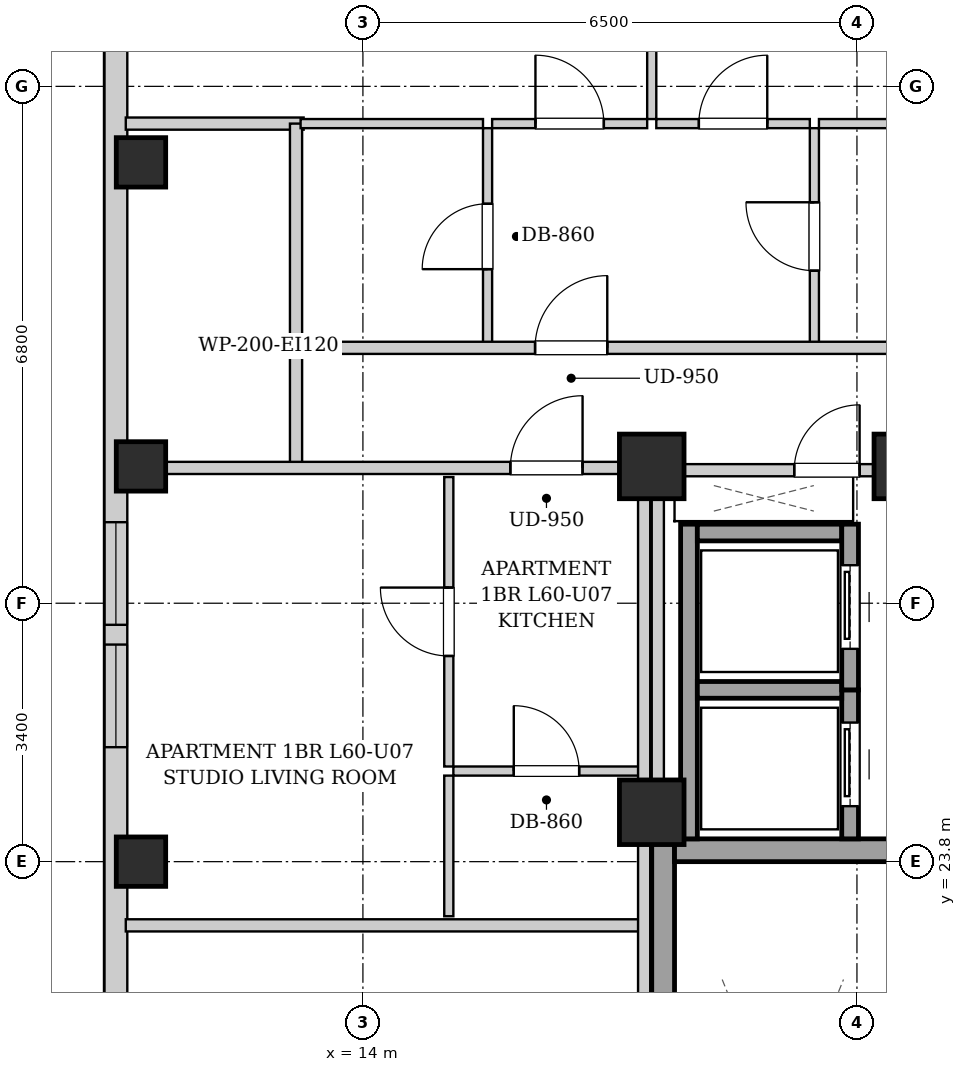
"""IFC4 building model, lengths in metres.
Left out: names, types, materials, properties, quantities, classifications, styles, units other than length and angle.
Written with IfcOpenShell. Run it as: python <this file> out.ifc"""

import sys

from ifc_helpers import new_model, si_unit, direction, frame, frame_2d, origin, origin_2d, place, context, subcontext, project, spatial, rectangle, extrude, element, fill, save


model = new_model("IFC4")
c1 = context("Model", 3, precision=1e-05, world=origin(), true_north=direction((0.0, 1.0)))
c2 = subcontext(c1, "Body", "Model", "MODEL_VIEW")
j1 = project(units=[si_unit("LENGTHUNIT", "METRE"), si_unit("PLANEANGLEUNIT", "RADIAN")], contexts=[c1])
p1 = place(None, origin())
s1 = spatial("IfcSite", under=j1, at=p1, CompositionType="ELEMENT")
p2 = place(p1, origin())
s2 = spatial("IfcBuilding", under=s1, at=p2, CompositionType="ELEMENT")
p3 = place(p2, frame((0.0, 0.0, 207.4)))
s3 = spatial("IfcBuildingStorey", under=s2, at=p3, CompositionType="ELEMENT", Elevation=207.4)
for number, where, z_axis, x_axis in (
    (1, (11.08, 23.8, 0.0), (0.0, 0.0, 1.0), (1.0, 0.0, 0.0)),
    (2, (11.08, 29.0, 0.0), (0.0, 0.0, 1.0), (1.0, 0.0, 0.0)),
    (3, (11.08, 33.0, 0.0), (0.0, 0.0, 1.0), (1.0, 0.0, 0.0)),
):
    element("IfcColumn", number, at=place(p3, frame(where, z_axis=z_axis, x_axis=x_axis)), inside=s3, PredefinedType="COLUMN", context=c2, shape_type="SweptSolid", body=[
        extrude(rectangle(XDim=0.65, YDim=0.65, at=origin_2d()), origin(), (0.0, 0.0, 1.0), 3.3),
    ])
for number, where, z_axis, x_axis in (
    (4, (17.8, 29.0, 0.0), (0.0, 0.0, 1.0), (1.0, 0.0, 0.0)),
    (5, (21.15, 29.0, 0.0), (0.0, 0.0, 1.0), (1.0, 0.0, 0.0)),
    (6, (17.8, 24.45, 0.0), (0.0, 0.0, 1.0), (1.0, 0.0, 0.0)),
):
    element("IfcColumn", number, at=place(p3, frame(where, z_axis=z_axis, x_axis=x_axis)), inside=s3, PredefinedType="COLUMN", context=c2, shape_type="SweptSolid", body=[
        extrude(rectangle(XDim=0.85, YDim=0.85, at=origin_2d()), origin(), (0.0, 0.0, 1.0), 3.3),
    ])
p4 = place(p3, frame((10.75, 6.3, 0.0), z_axis=(0.0, 0.0, 1.0), x_axis=(0.0, 1.0, 0.0)))
e7 = element("IfcWall", 7, at=p4, inside=s3, PredefinedType="SOLIDWALL", context=c2, shape_type="SweptSolid", body=[
    extrude(rectangle(XDim=31.4, YDim=0.3, at=frame_2d((15.7, 0.0))), origin(), (0.0, 0.0, 1.0), 3.04),
])
p5 = place(p4, frame((1.504, 0.0, 0.55)))
e8 = element("IfcOpeningElement", 8, at=p5, cuts=e7, PredefinedType="OPENING", context=c2, shape_type="SweptSolid", body=[
    extrude(rectangle(XDim=1.35, YDim=1.2, at=frame_2d((0.675, 0.6))), frame((0.0, 0.16, 0.0), z_axis=(0.0, -1.0, 0.0), x_axis=(1.0, 0.0, 0.0)), (0.0, 0.0, 1.0), 0.32),
])
p6 = place(p4, frame((28.546, 0.0, 0.55)))
e9 = element("IfcOpeningElement", 9, at=p6, cuts=e7, PredefinedType="OPENING", context=c2, shape_type="SweptSolid", body=[
    extrude(rectangle(XDim=1.35, YDim=1.2, at=frame_2d((0.675, 0.6))), frame((0.0, 0.16, 0.0), z_axis=(0.0, -1.0, 0.0), x_axis=(1.0, 0.0, 0.0)), (0.0, 0.0, 1.0), 0.32),
])
p7 = place(p4, frame((11.85, 0.0, 0.55)))
e10 = element("IfcOpeningElement", 10, at=p7, cuts=e7, PredefinedType="OPENING", context=c2, shape_type="SweptSolid", body=[
    extrude(rectangle(XDim=1.35, YDim=1.2, at=frame_2d((0.675, 0.6))), frame((0.0, 0.16, 0.0), z_axis=(0.0, -1.0, 0.0), x_axis=(1.0, 0.0, 0.0)), (0.0, 0.0, 1.0), 0.32),
])
p8 = place(p4, frame((9.185, 0.0, 0.55)))
e11 = element("IfcOpeningElement", 11, at=p8, cuts=e7, PredefinedType="OPENING", context=c2, shape_type="SweptSolid", body=[
    extrude(rectangle(XDim=1.35, YDim=1.2, at=frame_2d((0.675, 0.6))), frame((0.0, 0.16, 0.0), z_axis=(0.0, -1.0, 0.0), x_axis=(1.0, 0.0, 0.0)), (0.0, 0.0, 1.0), 0.32),
])
p9 = place(p4, frame((19.006, 0.0, 0.55)))
e12 = element("IfcOpeningElement", 12, at=p9, cuts=e7, PredefinedType="OPENING", context=c2, shape_type="SweptSolid", body=[
    extrude(rectangle(XDim=1.35, YDim=1.2, at=frame_2d((0.675, 0.6))), frame((0.0, 0.16, 0.0), z_axis=(0.0, -1.0, 0.0), x_axis=(1.0, 0.0, 0.0)), (0.0, 0.0, 1.0), 0.32),
])
p10 = place(p4, frame((20.616, 0.0, 0.55)))
e13 = element("IfcOpeningElement", 13, at=p10, cuts=e7, PredefinedType="OPENING", context=c2, shape_type="SweptSolid", body=[
    extrude(rectangle(XDim=1.35, YDim=1.2, at=frame_2d((0.675, 0.6))), frame((0.0, 0.16, 0.0), z_axis=(0.0, -1.0, 0.0), x_axis=(1.0, 0.0, 0.0)), (0.0, 0.0, 1.0), 0.32),
])
p11 = place(p3, frame((17.95, 15.1, 0.0), z_axis=(0.0, 0.0, 1.0), x_axis=(0.0, 1.0, 0.0)))
e14 = element("IfcWall", 14, at=p11, inside=s3, PredefinedType="SHEAR", context=c2, shape_type="SweptSolid", body=[
    extrude(rectangle(XDim=9.0, YDim=0.3, at=frame_2d((4.5, 0.0))), origin(), (0.0, 0.0, 1.0), 3.04),
])
p12 = place(p3, frame((18.1, 23.95, 0.0), z_axis=(0.0, 0.0, 1.0), x_axis=(1.0, 0.0, 0.0)))
e15 = element("IfcWall", 15, at=p12, inside=s3, PredefinedType="SHEAR", context=c2, shape_type="SweptSolid", body=[
    extrude(rectangle(XDim=2.85, YDim=0.3, at=frame_2d((1.425, 0.0))), origin(), (0.0, 0.0, 1.0), 3.04),
])
p13 = place(p3, frame((18.29, 24.1, 0.0), z_axis=(0.0, 0.0, 1.0), x_axis=(0.0, 1.0, 0.0)))
e16 = element("IfcWall", 16, at=p13, inside=s3, PredefinedType="SHEAR", context=c2, shape_type="SweptSolid", body=[
    extrude(rectangle(XDim=4.14, YDim=0.22, at=frame_2d((2.07, 0.0))), origin(), (0.0, 0.0, 1.0), 3.04),
])
p14 = place(p3, frame((20.41, 24.1, 0.0), z_axis=(0.0, 0.0, 1.0), x_axis=(0.0, 1.0, 0.0)))
e17 = element("IfcWall", 17, at=p14, inside=s3, PredefinedType="SHEAR", context=c2, shape_type="SweptSolid", body=[
    extrude(rectangle(XDim=1.96, YDim=0.22, at=frame_2d((0.98, 0.0))), origin(), (0.0, 0.0, 1.0), 3.04),
])
p15 = place(p14, frame((0.43, 0.0, 0.0)))
e18 = element("IfcOpeningElement", 18, at=p15, cuts=e17, PredefinedType="OPENING", context=c2, shape_type="SweptSolid", body=[
    extrude(rectangle(XDim=1.1, YDim=2.15, at=frame_2d((0.55, 1.075))), frame((0.0, 0.12, 0.0), z_axis=(0.0, -1.0, 0.0), x_axis=(1.0, 0.0, 0.0)), (0.0, 0.0, 1.0), 0.24),
])
for number, where, z_axis, x_axis in (
    (19, (18.4, 26.06, 0.0), (0.0, 0.0, 1.0), (1.0, 0.0, 0.0)),
    (20, (18.4, 28.13, 0.0), (0.0, 0.0, 1.0), (1.0, 0.0, 0.0)),
):
    element("IfcWall", number, at=place(p3, frame(where, z_axis=z_axis, x_axis=x_axis)), inside=s3, PredefinedType="SHEAR", context=c2, shape_type="SweptSolid", body=[
        extrude(rectangle(XDim=1.9, YDim=0.22, at=frame_2d((0.95, 0.0))), origin(), (0.0, 0.0, 1.0), 3.04),
    ])
p16 = place(p3, frame((20.41, 26.06, 0.0), z_axis=(0.0, 0.0, 1.0), x_axis=(0.0, 1.0, 0.0)))
e21 = element("IfcWall", 21, at=p16, inside=s3, PredefinedType="SHEAR", context=c2, shape_type="SweptSolid", body=[
    extrude(rectangle(XDim=2.18, YDim=0.22, at=frame_2d((1.09, 0.0))), origin(), (0.0, 0.0, 1.0), 3.04),
])
p17 = place(p16, frame((0.54, 0.0, 0.0)))
e22 = element("IfcOpeningElement", 22, at=p17, cuts=e21, PredefinedType="OPENING", context=c2, shape_type="SweptSolid", body=[
    extrude(rectangle(XDim=1.1, YDim=2.15, at=frame_2d((0.55, 1.075))), frame((0.0, 0.12, 0.0), z_axis=(0.0, -1.0, 0.0), x_axis=(1.0, 0.0, 0.0)), (0.0, 0.0, 1.0), 0.24),
])
p18 = place(p3, frame((17.88, 24.12, 0.0), z_axis=(0.0, 0.0, 1.0), x_axis=(0.0, 1.0, 0.0)))
e23 = element("IfcWall", 23, at=p18, inside=s3, PredefinedType="PARTITIONING", context=c2, shape_type="SweptSolid", body=[
    extrude(rectangle(XDim=4.76, YDim=0.16, at=frame_2d((2.38, 0.0))), origin(), (0.0, 0.0, 1.0), 2.375),
])
p19 = place(p3, frame((17.96, 28.95, 0.0), z_axis=(0.0, 0.0, 1.0), x_axis=(1.0, 0.0, 0.0)))
e24 = element("IfcWall", 24, at=p19, inside=s3, PredefinedType="PARTITIONING", context=c2, shape_type="SweptSolid", body=[
    extrude(rectangle(XDim=4.29, YDim=0.16, at=frame_2d((2.145, 0.0))), origin(), (0.0, 0.0, 1.0), 2.556),
])
p20 = place(p19, frame((1.715, 0.0, 0.0)))
e25 = element("IfcOpeningElement", 25, at=p20, cuts=e24, PredefinedType="OPENING", context=c2, shape_type="SweptSolid", body=[
    extrude(rectangle(XDim=0.86, YDim=2.05, at=frame_2d((0.43, 1.025))), frame((0.0, 0.09, 0.0), z_axis=(0.0, -1.0, 0.0), x_axis=(1.0, 0.0, 0.0)), (0.0, 0.0, 1.0), 0.18),
])
p21 = place(p3, frame((13.12, 28.98, 0.0), z_axis=(0.0, 0.0, 1.0), x_axis=(0.0, 1.0, 0.0)))
e26 = element("IfcWall", 26, at=p21, inside=s3, PredefinedType="PARTITIONING", context=c2, shape_type="SweptSolid", body=[
    extrude(rectangle(XDim=1.58, YDim=0.16, at=frame_2d((0.79, 0.0))), origin(), (0.0, 0.0, 1.0), 3.04),
])
p22 = place(p3, frame((10.88, 33.51, 0.0), z_axis=(0.0, 0.0, 1.0), x_axis=(1.0, 0.0, 0.0)))
e27 = element("IfcWall", 27, at=p22, inside=s3, PredefinedType="PARTITIONING", context=c2, shape_type="SweptSolid", body=[
    extrude(rectangle(XDim=2.34, YDim=0.16, at=frame_2d((1.17, 0.0))), origin(), (0.0, 0.0, 1.0), 3.04),
])
p23 = place(p3, frame((13.12, 30.6, 0.0), z_axis=(0.0, 0.0, 1.0), x_axis=(0.0, 1.0, 0.0)))
e28 = element("IfcWall", 28, at=p23, inside=s3, PredefinedType="PARTITIONING", context=c2, shape_type="SweptSolid", body=[
    extrude(rectangle(XDim=2.91, YDim=0.16, at=frame_2d((1.455, 0.0))), origin(), (0.0, 0.0, 1.0), 3.04),
])
p24 = place(p3, frame((15.64, 30.6, 0.0), z_axis=(0.0, 0.0, 1.0), x_axis=(0.0, 1.0, 0.0)))
e29 = element("IfcWall", 29, at=p24, inside=s3, PredefinedType="PARTITIONING", context=c2, shape_type="SweptSolid", body=[
    extrude(rectangle(XDim=2.85, YDim=0.12, at=frame_2d((1.425, 0.0))), origin(), (0.0, 0.0, 1.0), 3.04),
])
p25 = place(p24, frame((0.995, 0.0, 0.0)))
e30 = element("IfcOpeningElement", 30, at=p25, cuts=e29, PredefinedType="OPENING", context=c2, shape_type="SweptSolid", body=[
    extrude(rectangle(XDim=0.86, YDim=2.05, at=frame_2d((0.43, 1.025))), frame((0.0, 0.07, 0.0), z_axis=(0.0, -1.0, 0.0), x_axis=(1.0, 0.0, 0.0)), (0.0, 0.0, 1.0), 0.14),
])
p26 = place(p3, frame((13.18, 33.51, 0.0), z_axis=(0.0, 0.0, 1.0), x_axis=(1.0, 0.0, 0.0)))
e31 = element("IfcWall", 31, at=p26, inside=s3, PredefinedType="PARTITIONING", context=c2, shape_type="SweptSolid", body=[
    extrude(rectangle(XDim=2.4, YDim=0.12, at=frame_2d((1.2, 0.0))), origin(), (0.0, 0.0, 1.0), 3.04),
])
p27 = place(p3, frame((19.94, 30.6, 0.0), z_axis=(0.0, 0.0, 1.0), x_axis=(0.0, 1.0, 0.0)))
e32 = element("IfcWall", 32, at=p27, inside=s3, PredefinedType="PARTITIONING", context=c2, shape_type="SweptSolid", body=[
    extrude(rectangle(XDim=2.85, YDim=0.12, at=frame_2d((1.425, 0.0))), origin(), (0.0, 0.0, 1.0), 3.04),
])
p28 = place(p27, frame((0.975, 0.0, 0.0)))
e33 = element("IfcOpeningElement", 33, at=p28, cuts=e32, PredefinedType="OPENING", context=c2, shape_type="SweptSolid", body=[
    extrude(rectangle(XDim=0.9, YDim=2.05, at=frame_2d((0.45, 1.025))), frame((0.0, 0.07, 0.0), z_axis=(0.0, -1.0, 0.0), x_axis=(1.0, 0.0, 0.0)), (0.0, 0.0, 1.0), 0.14),
])
p29 = place(p3, frame((15.7, 33.51, 0.0), z_axis=(0.0, 0.0, 1.0), x_axis=(1.0, 0.0, 0.0)))
e34 = element("IfcWall", 34, at=p29, inside=s3, PredefinedType="PARTITIONING", context=c2, shape_type="SweptSolid", body=[
    extrude(rectangle(XDim=2.04, YDim=0.12, at=frame_2d((1.02, 0.0))), origin(), (0.0, 0.0, 1.0), 3.04),
])
p30 = place(p29, frame((0.57, 0.0, 0.0)))
e35 = element("IfcOpeningElement", 35, at=p30, cuts=e34, PredefinedType="OPENING", context=c2, shape_type="SweptSolid", body=[
    extrude(rectangle(XDim=0.9, YDim=2.05, at=frame_2d((0.45, 1.025))), frame((0.0, 0.07, 0.0), z_axis=(0.0, -1.0, 0.0), x_axis=(1.0, 0.0, 0.0)), (0.0, 0.0, 1.0), 0.14),
])
p31 = place(p3, frame((17.86, 33.51, 0.0), z_axis=(0.0, 0.0, 1.0), x_axis=(1.0, 0.0, 0.0)))
e36 = element("IfcWall", 36, at=p31, inside=s3, PredefinedType="PARTITIONING", context=c2, shape_type="SweptSolid", body=[
    extrude(rectangle(XDim=2.02, YDim=0.12, at=frame_2d((1.01, 0.0))), origin(), (0.0, 0.0, 1.0), 3.04),
])
p32 = place(p31, frame((0.56, 0.0, 0.0)))
e37 = element("IfcOpeningElement", 37, at=p32, cuts=e36, PredefinedType="OPENING", context=c2, shape_type="SweptSolid", body=[
    extrude(rectangle(XDim=0.9, YDim=2.05, at=frame_2d((0.45, 1.025))), frame((0.0, 0.07, 0.0), z_axis=(0.0, -1.0, 0.0), x_axis=(1.0, 0.0, 0.0)), (0.0, 0.0, 1.0), 0.14),
])
p33 = place(p3, frame((20.0, 33.51, 0.0), z_axis=(0.0, 0.0, 1.0), x_axis=(1.0, 0.0, 0.0)))
e38 = element("IfcWall", 38, at=p33, inside=s3, PredefinedType="PARTITIONING", context=c2, shape_type="SweptSolid", body=[
    extrude(rectangle(XDim=0.977, YDim=0.12, at=frame_2d((0.489, 0.0))), origin(), (0.0, 0.0, 1.0), 3.04),
])
p34 = place(p3, frame((17.8, 33.57, 0.0), z_axis=(0.0, 0.0, 1.0), x_axis=(0.0, 1.0, 0.0)))
e39 = element("IfcWall", 39, at=p34, inside=s3, PredefinedType="PARTITIONING", context=c2, shape_type="SweptSolid", body=[
    extrude(rectangle(XDim=4.2, YDim=0.12, at=frame_2d((2.1, 0.0))), origin(), (0.0, 0.0, 1.0), 2.556),
])
p35 = place(p34, frame((1.65, 0.0, 0.0)))
e40 = element("IfcOpeningElement", 40, at=p35, cuts=e39, PredefinedType="OPENING", context=c2, shape_type="SweptSolid", body=[
    extrude(rectangle(XDim=0.9, YDim=2.05, at=frame_2d((0.45, 1.025))), frame((0.0, 0.07, 0.0), z_axis=(0.0, -1.0, 0.0), x_axis=(1.0, 0.0, 0.0)), (0.0, 0.0, 1.0), 0.14),
])
p36 = place(p3, frame((10.88, 22.962, 0.0), z_axis=(0.0, 0.0, 1.0), x_axis=(1.0, 0.0, 0.0)))
e41 = element("IfcWall", 41, at=p36, inside=s3, PredefinedType="PARTITIONING", context=c2, shape_type="SweptSolid", body=[
    extrude(rectangle(XDim=6.76, YDim=0.16, at=frame_2d((3.38, 0.0))), origin(), (0.0, 0.0, 1.0), 3.04),
])
p37 = place(p3, frame((10.88, 28.98, 0.0), z_axis=(0.0, 0.0, 1.0), x_axis=(1.0, 0.0, 0.0)))
e42 = element("IfcWall", 42, at=p37, inside=s3, PredefinedType="PARTITIONING", context=c2, shape_type="SweptSolid", body=[
    extrude(rectangle(XDim=6.88, YDim=0.16, at=frame_2d((3.44, 0.0))), origin(), (0.0, 0.0, 1.0), 2.556),
])
p38 = place(p37, frame((5.06, 0.0, 0.0)))
e43 = element("IfcOpeningElement", 43, at=p38, cuts=e42, PredefinedType="OPENING", context=c2, shape_type="SweptSolid", body=[
    extrude(rectangle(XDim=0.95, YDim=2.1, at=frame_2d((0.475, 1.05))), frame((0.0, 0.09, 0.0), z_axis=(0.0, -1.0, 0.0), x_axis=(1.0, 0.0, 0.0)), (0.0, 0.0, 1.0), 0.18),
])
p39 = place(p3, frame((15.19, 24.992, 0.0), z_axis=(0.0, 0.0, 1.0), x_axis=(1.0, 0.0, 0.0)))
e44 = element("IfcWall", 44, at=p39, inside=s3, PredefinedType="PARTITIONING", context=c2, shape_type="SweptSolid", body=[
    extrude(rectangle(XDim=2.45, YDim=0.12, at=frame_2d((1.225, 0.0))), origin(), (0.0, 0.0, 1.0), 3.04),
])
p40 = place(p39, frame((0.795, 0.0, 0.0)))
e45 = element("IfcOpeningElement", 45, at=p40, cuts=e44, PredefinedType="OPENING", context=c2, shape_type="SweptSolid", body=[
    extrude(rectangle(XDim=0.86, YDim=2.05, at=frame_2d((0.43, 1.025))), frame((0.0, 0.07, 0.0), z_axis=(0.0, -1.0, 0.0), x_axis=(1.0, 0.0, 0.0)), (0.0, 0.0, 1.0), 0.14),
])
p41 = place(p3, frame((15.13, 23.082, 0.0), z_axis=(0.0, 0.0, 1.0), x_axis=(0.0, 1.0, 0.0)))
e46 = element("IfcWall", 46, at=p41, inside=s3, PredefinedType="PARTITIONING", context=c2, shape_type="SweptSolid", body=[
    extrude(rectangle(XDim=1.85, YDim=0.12, at=frame_2d((0.925, 0.0))), origin(), (0.0, 0.0, 1.0), 3.04),
])
p42 = place(p3, frame((15.13, 25.052, 0.0), z_axis=(0.0, 0.0, 1.0), x_axis=(0.0, 1.0, 0.0)))
e47 = element("IfcWall", 47, at=p42, inside=s3, PredefinedType="PARTITIONING", context=c2, shape_type="SweptSolid", body=[
    extrude(rectangle(XDim=3.808, YDim=0.12, at=frame_2d((1.904, 0.0))), origin(), (0.0, 0.0, 1.0), 3.04),
])
p43 = place(p42, frame((1.454, 0.0, 0.0)))
e48 = element("IfcOpeningElement", 48, at=p43, cuts=e47, PredefinedType="OPENING", context=c2, shape_type="SweptSolid", body=[
    extrude(rectangle(XDim=0.9, YDim=2.05, at=frame_2d((0.45, 1.025))), frame((0.0, 0.07, 0.0), z_axis=(0.0, -1.0, 0.0), x_axis=(1.0, 0.0, 0.0)), (0.0, 0.0, 1.0), 0.14),
])
p44 = place(p3, frame((13.15, 30.56, 0.0), z_axis=(0.0, 0.0, 1.0), x_axis=(1.0, 0.0, 0.0)))
e49 = element("IfcWall", 49, at=p44, inside=s3, PredefinedType="PARTITIONING", context=c2, shape_type="SweptSolid", body=[
    extrude(rectangle(XDim=24.6, YDim=0.16, at=frame_2d((12.3, 0.0))), origin(), (0.0, 0.0, 1.0), 3.04),
])
p45 = place(p44, frame((3.115, 0.0, 0.0)))
e50 = element("IfcOpeningElement", 50, at=p45, cuts=e49, PredefinedType="OPENING", context=c2, shape_type="SweptSolid", body=[
    extrude(rectangle(XDim=0.95, YDim=2.1, at=frame_2d((0.475, 1.05))), frame((0.0, 0.09, 0.0), z_axis=(0.0, -1.0, 0.0), x_axis=(1.0, 0.0, 0.0)), (0.0, 0.0, 1.0), 0.18),
])
p46 = place(p44, frame((21.55, 0.0, 0.0)))
e51 = element("IfcOpeningElement", 51, at=p46, cuts=e49, PredefinedType="OPENING", context=c2, shape_type="SweptSolid", body=[
    extrude(rectangle(XDim=0.95, YDim=2.1, at=frame_2d((0.475, 1.05))), frame((0.0, 0.09, 0.0), z_axis=(0.0, -1.0, 0.0), x_axis=(1.0, 0.0, 0.0)), (0.0, 0.0, 1.0), 0.18),
])
p47 = place(p3, frame((17.7, 15.02, 0.0), z_axis=(0.0, 0.0, 1.0), x_axis=(0.0, 1.0, 0.0)))
e52 = element("IfcWall", 52, at=p47, inside=s3, PredefinedType="PARTITIONING", context=c2, shape_type="SweptSolid", body=[
    extrude(rectangle(XDim=13.98, YDim=0.16, at=frame_2d((6.99, 0.0))), origin(), (0.0, 0.0, 1.0), 2.375),
])
p48 = place(p15, origin())
e53 = element("IfcDoor", 53, at=p48, inside=s3, OperationType="SLIDING_TO_LEFT", PredefinedType="DOOR", context=c2, shape_type="SweptSolid", body=[
    extrude(rectangle(XDim=1.1, YDim=2.15, at=frame_2d((0.55, 1.075))), frame((0.0, 0.025, 0.0), z_axis=(0.0, -1.0, 0.0), x_axis=(1.0, 0.0, 0.0)), (0.0, 0.0, 1.0), 0.05),
])
fill(e18, e53)
p49 = place(p17, origin())
e54 = element("IfcDoor", 54, at=p49, inside=s3, OperationType="SLIDING_TO_LEFT", PredefinedType="DOOR", context=c2, shape_type="SweptSolid", body=[
    extrude(rectangle(XDim=1.1, YDim=2.15, at=frame_2d((0.55, 1.075))), frame((0.0, 0.025, 0.0), z_axis=(0.0, -1.0, 0.0), x_axis=(1.0, 0.0, 0.0)), (0.0, 0.0, 1.0), 0.05),
])
fill(e22, e54)
p50 = place(p20, origin())
e55 = element("IfcDoor", 55, at=p50, inside=s3, OperationType="SINGLE_SWING_RIGHT", PredefinedType="DOOR", context=c2, shape_type="SweptSolid", body=[
    extrude(rectangle(XDim=0.86, YDim=2.05, at=frame_2d((0.43, 1.025))), frame((0.0, 0.025, 0.0), z_axis=(0.0, -1.0, 0.0), x_axis=(1.0, 0.0, 0.0)), (0.0, 0.0, 1.0), 0.05),
])
fill(e25, e55)
p51 = place(p25, origin())
e56 = element("IfcDoor", 56, at=p51, inside=s3, OperationType="SINGLE_SWING_LEFT", PredefinedType="DOOR", context=c2, shape_type="SweptSolid", body=[
    extrude(rectangle(XDim=0.86, YDim=2.05, at=frame_2d((0.43, 1.025))), frame((0.0, 0.025, 0.0), z_axis=(0.0, -1.0, 0.0), x_axis=(1.0, 0.0, 0.0)), (0.0, 0.0, 1.0), 0.05),
])
fill(e30, e56)
p52 = place(p28, origin())
e57 = element("IfcDoor", 57, at=p52, inside=s3, OperationType="SINGLE_SWING_RIGHT", PredefinedType="DOOR", context=c2, shape_type="SweptSolid", body=[
    extrude(rectangle(XDim=0.9, YDim=2.05, at=frame_2d((0.45, 1.025))), frame((0.0, 0.025, 0.0), z_axis=(0.0, -1.0, 0.0), x_axis=(1.0, 0.0, 0.0)), (0.0, 0.0, 1.0), 0.05),
])
fill(e33, e57)
p53 = place(p30, origin())
e58 = element("IfcDoor", 58, at=p53, inside=s3, OperationType="SINGLE_SWING_LEFT", PredefinedType="DOOR", context=c2, shape_type="SweptSolid", body=[
    extrude(rectangle(XDim=0.9, YDim=2.05, at=frame_2d((0.45, 1.025))), frame((0.0, 0.025, 0.0), z_axis=(0.0, -1.0, 0.0), x_axis=(1.0, 0.0, 0.0)), (0.0, 0.0, 1.0), 0.05),
])
fill(e35, e58)
p54 = place(p32, origin())
e59 = element("IfcDoor", 59, at=p54, inside=s3, OperationType="SINGLE_SWING_RIGHT", PredefinedType="DOOR", context=c2, shape_type="SweptSolid", body=[
    extrude(rectangle(XDim=0.9, YDim=2.05, at=frame_2d((0.45, 1.025))), frame((0.0, 0.025, 0.0), z_axis=(0.0, -1.0, 0.0), x_axis=(1.0, 0.0, 0.0)), (0.0, 0.0, 1.0), 0.05),
])
fill(e37, e59)
p55 = place(p38, origin())
e60 = element("IfcDoor", 60, at=p55, inside=s3, OperationType="SINGLE_SWING_RIGHT", PredefinedType="DOOR", context=c2, shape_type="SweptSolid", body=[
    extrude(rectangle(XDim=0.95, YDim=2.1, at=frame_2d((0.475, 1.05))), frame((0.0, 0.025, 0.0), z_axis=(0.0, -1.0, 0.0), x_axis=(1.0, 0.0, 0.0)), (0.0, 0.0, 1.0), 0.05),
])
fill(e43, e60)
p56 = place(p40, origin())
e61 = element("IfcDoor", 61, at=p56, inside=s3, OperationType="SINGLE_SWING_LEFT", PredefinedType="DOOR", context=c2, shape_type="SweptSolid", body=[
    extrude(rectangle(XDim=0.86, YDim=2.05, at=frame_2d((0.43, 1.025))), frame((0.0, 0.025, 0.0), z_axis=(0.0, -1.0, 0.0), x_axis=(1.0, 0.0, 0.0)), (0.0, 0.0, 1.0), 0.05),
])
fill(e45, e61)
p57 = place(p43, origin())
e62 = element("IfcDoor", 62, at=p57, inside=s3, OperationType="SINGLE_SWING_RIGHT", PredefinedType="DOOR", context=c2, shape_type="SweptSolid", body=[
    extrude(rectangle(XDim=0.9, YDim=2.05, at=frame_2d((0.45, 1.025))), frame((0.0, 0.025, 0.0), z_axis=(0.0, -1.0, 0.0), x_axis=(1.0, 0.0, 0.0)), (0.0, 0.0, 1.0), 0.05),
])
fill(e48, e62)
p58 = place(p45, origin())
e63 = element("IfcDoor", 63, at=p58, inside=s3, OperationType="SINGLE_SWING_RIGHT", PredefinedType="DOOR", context=c2, shape_type="SweptSolid", body=[
    extrude(rectangle(XDim=0.95, YDim=2.1, at=frame_2d((0.475, 1.05))), frame((0.0, 0.025, 0.0), z_axis=(0.0, -1.0, 0.0), x_axis=(1.0, 0.0, 0.0)), (0.0, 0.0, 1.0), 0.05),
])
fill(e50, e63)
p59 = place(p9, origin())
e64 = element("IfcWindow", 64, at=p59, inside=s3, PartitioningType="SINGLE_PANEL", PredefinedType="WINDOW", context=c2, shape_type="SweptSolid", body=[
    extrude(rectangle(XDim=1.35, YDim=1.2, at=frame_2d((0.675, 0.6))), frame((0.0, 0.03, 0.0), z_axis=(0.0, -1.0, 0.0), x_axis=(1.0, 0.0, 0.0)), (0.0, 0.0, 1.0), 0.06),
])
fill(e12, e64)
p60 = place(p10, origin())
e65 = element("IfcWindow", 65, at=p60, inside=s3, PartitioningType="SINGLE_PANEL", PredefinedType="WINDOW", context=c2, shape_type="SweptSolid", body=[
    extrude(rectangle(XDim=1.35, YDim=1.2, at=frame_2d((0.675, 0.6))), frame((0.0, 0.03, 0.0), z_axis=(0.0, -1.0, 0.0), x_axis=(1.0, 0.0, 0.0)), (0.0, 0.0, 1.0), 0.06),
])
fill(e13, e65)
save(model, sys.argv[1])
